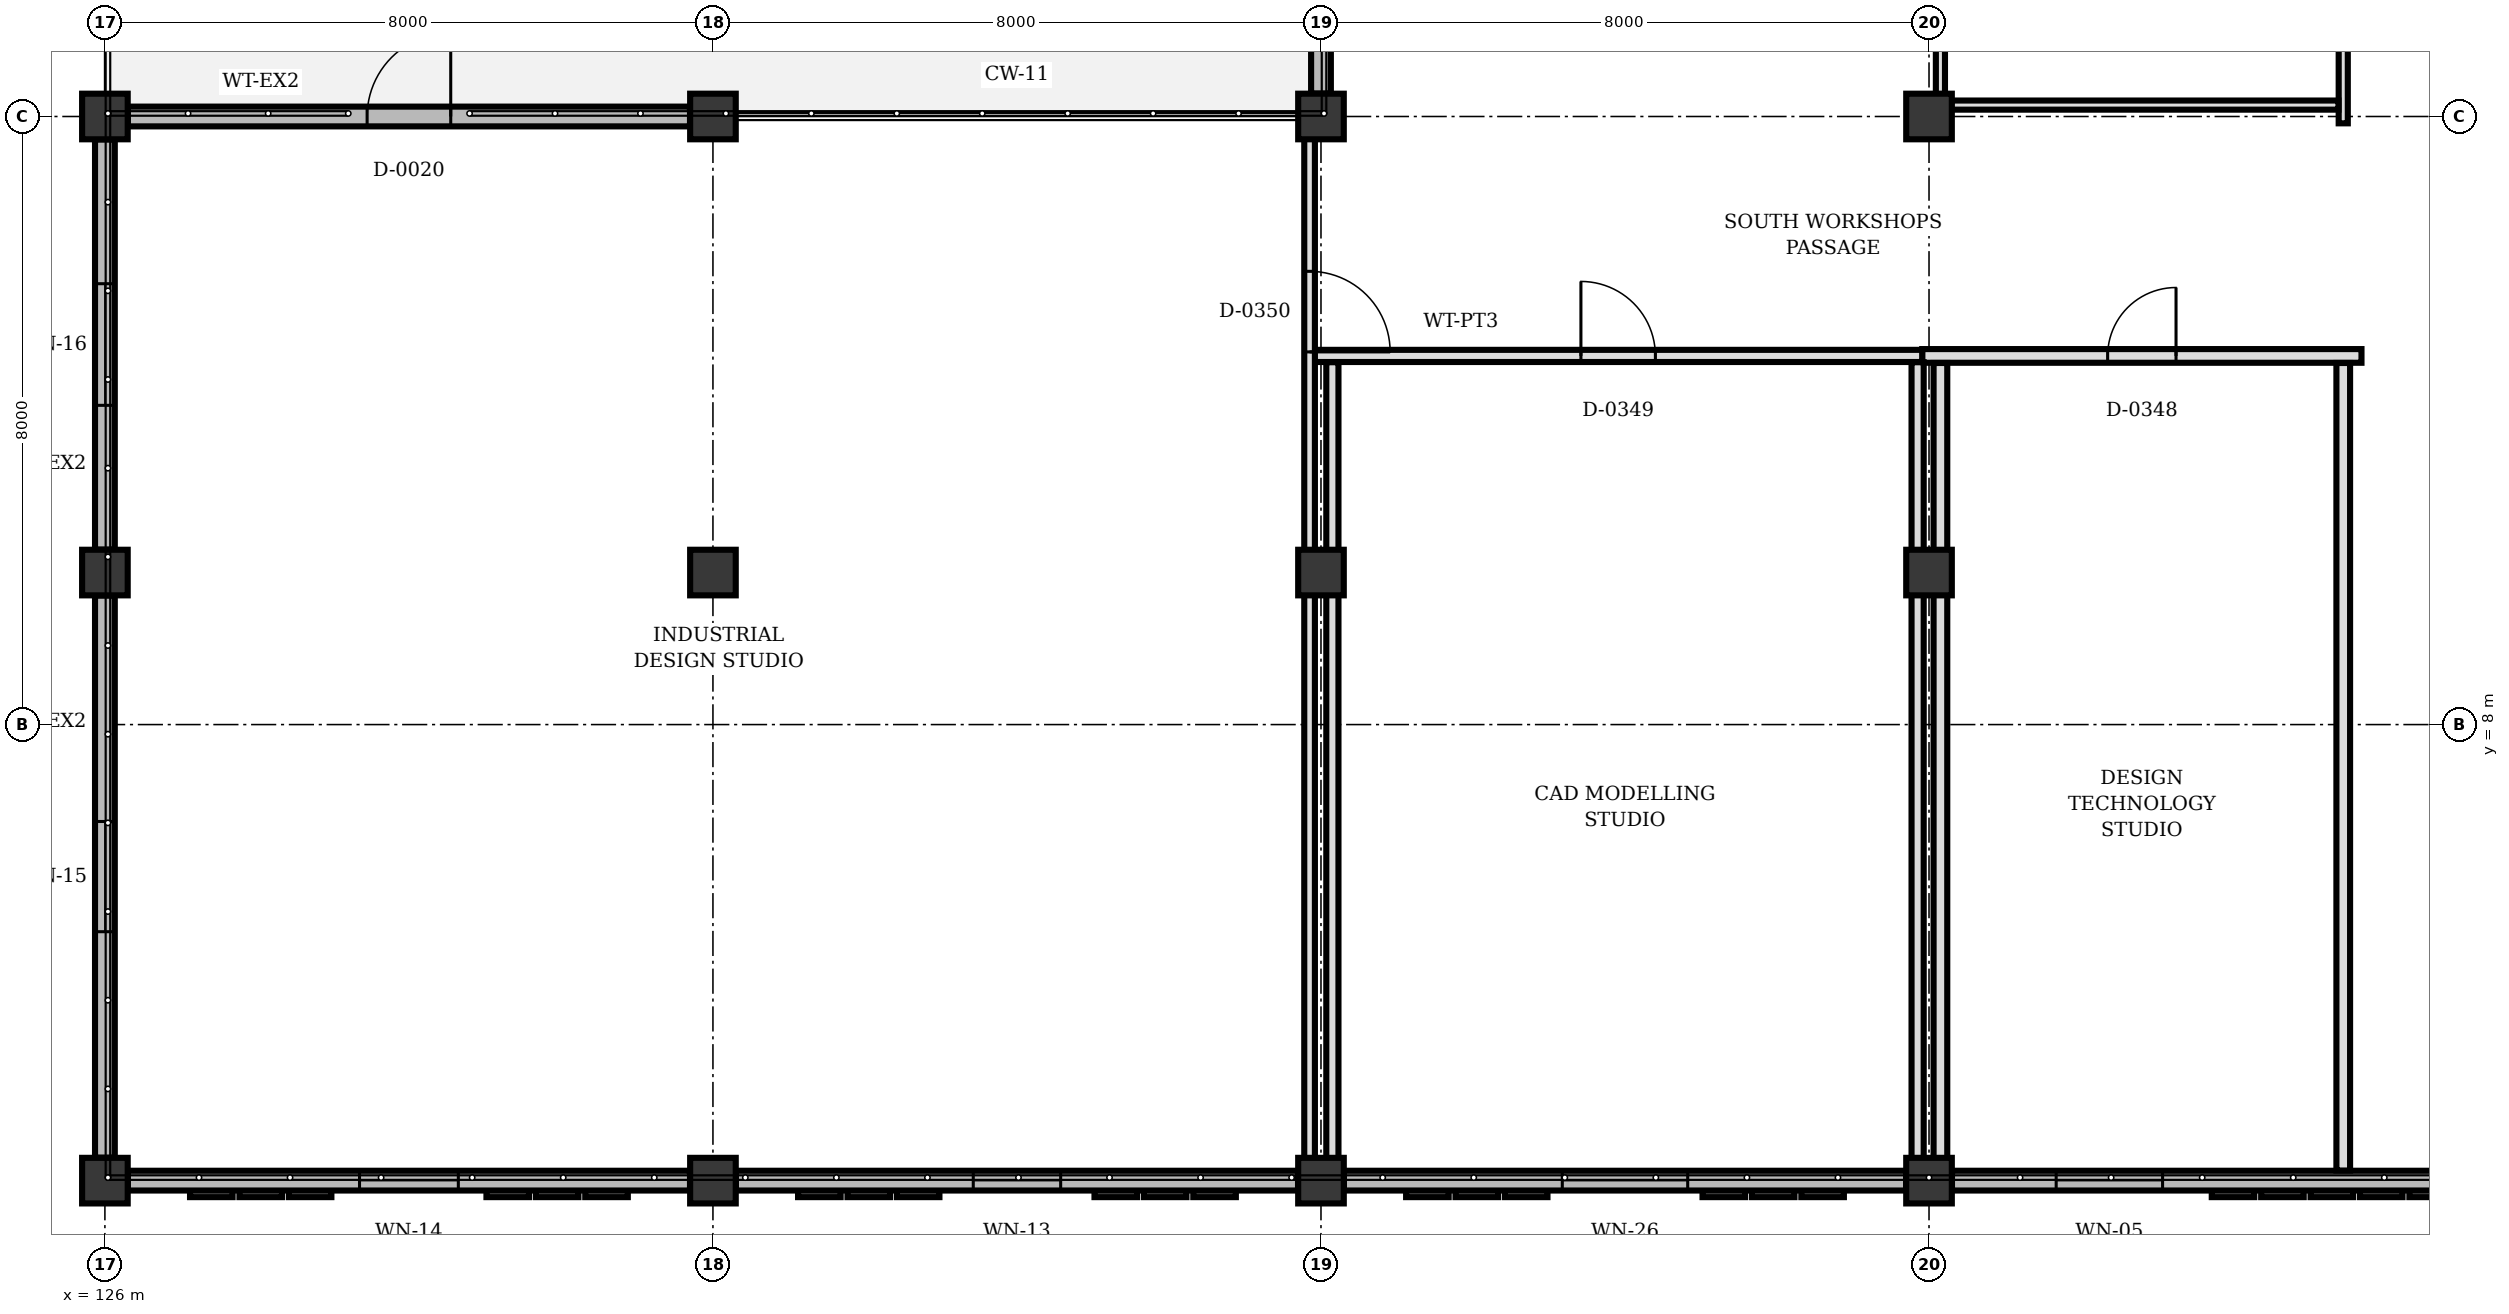
"""IFC4 building model, lengths in metres.
Left out: names, types, materials, properties, quantities, classifications, styles, units other than length and angle.
Written with IfcOpenShell. Run it as: python <this file> out.ifc"""

import sys

from ifc_helpers import new_model, si_unit, direction, frame, frame_2d, origin, origin_2d, place, context, subcontext, project, spatial, rectangle, extrude, element, fill, save


model = new_model("IFC4")
c1 = context("Model", 3, precision=1e-05, world=origin(), true_north=direction((0.0, 1.0)))
c2 = subcontext(c1, "Body", "Model", "MODEL_VIEW")
j1 = project(units=[si_unit("LENGTHUNIT", "METRE"), si_unit("PLANEANGLEUNIT", "RADIAN")], contexts=[c1])
p1 = place(None, origin())
s1 = spatial("IfcSite", under=j1, at=p1, CompositionType="ELEMENT")
p2 = place(p1, origin())
s2 = spatial("IfcBuilding", under=s1, at=p2, CompositionType="ELEMENT")
p3 = place(p2, frame((0.0, 0.0, 4.5)))
s3 = spatial("IfcBuildingStorey", under=s2, at=p3, CompositionType="ELEMENT", Elevation=4.5)
for number, where, z_axis, x_axis in (
    (1, (126.0, 10.0, 0.0), (0.0, 0.0, 1.0), (1.0, 0.0, 0.0)),
    (2, (126.0, 16.0, 0.0), (0.0, 0.0, 1.0), (1.0, 0.0, 0.0)),
    (3, (126.0, 2.0, 0.0), (0.0, 0.0, 1.0), (1.0, 0.0, 0.0)),
    (4, (134.0, 10.0, 0.0), (0.0, 0.0, 1.0), (1.0, 0.0, 0.0)),
    (5, (134.0, 16.0, 0.0), (0.0, 0.0, 1.0), (1.0, 0.0, 0.0)),
    (6, (134.0, 2.0, 0.0), (0.0, 0.0, 1.0), (1.0, 0.0, 0.0)),
    (7, (142.0, 10.0, 0.0), (0.0, 0.0, 1.0), (1.0, 0.0, 0.0)),
    (8, (142.0, 16.0, 0.0), (0.0, 0.0, 1.0), (1.0, 0.0, 0.0)),
    (9, (142.0, 2.0, 0.0), (0.0, 0.0, 1.0), (1.0, 0.0, 0.0)),
    (10, (150.0, 10.0, 0.0), (0.0, 0.0, 1.0), (1.0, 0.0, 0.0)),
    (11, (150.0, 16.0, 0.0), (0.0, 0.0, 1.0), (1.0, 0.0, 0.0)),
    (12, (150.0, 2.0, 0.0), (0.0, 0.0, 1.0), (1.0, 0.0, 0.0)),
):
    element("IfcColumn", number, at=place(p3, frame(where, z_axis=z_axis, x_axis=x_axis)), inside=s3, PredefinedType="COLUMN", context=c2, shape_type="SweptSolid", body=[
        extrude(rectangle(XDim=0.6, YDim=0.6, at=origin_2d()), origin(), (0.0, 0.0, 1.0), 4.0),
    ])
p4 = place(p3, frame((126.0, 2.302, 0.0), z_axis=(0.0, 0.0, 1.0), x_axis=(0.0, 1.0, 0.0)))
e13 = element("IfcWall", 13, at=p4, inside=s3, PredefinedType="SOLIDWALL", context=c2, shape_type="SweptSolid", body=[
    extrude(rectangle(XDim=7.396, YDim=0.26, at=frame_2d((3.698, 0.0))), origin(), (0.0, 0.0, 1.0), 3.152),
])
p5 = place(p4, frame((2.973, 0.0, 0.9)))
e14 = element("IfcOpeningElement", 14, at=p5, cuts=e13, PredefinedType="OPENING", context=c2, shape_type="SweptSolid", body=[
    extrude(rectangle(XDim=1.45, YDim=1.25, at=frame_2d((0.725, 0.625))), frame((0.0, 0.14, 0.0), z_axis=(0.0, -1.0, 0.0), x_axis=(1.0, 0.0, 0.0)), (0.0, 0.0, 1.0), 0.28),
])
p6 = place(p3, frame((126.0, 10.302, 0.0), z_axis=(0.0, 0.0, 1.0), x_axis=(0.0, 1.0, 0.0)))
e15 = element("IfcWall", 15, at=p6, inside=s3, PredefinedType="SOLIDWALL", context=c2, shape_type="SweptSolid", body=[
    extrude(rectangle(XDim=5.396, YDim=0.26, at=frame_2d((2.698, 0.0))), origin(), (0.0, 0.0, 1.0), 3.152),
])
p7 = place(p6, frame((1.898, 0.0, 0.9)))
e16 = element("IfcOpeningElement", 16, at=p7, cuts=e15, PredefinedType="OPENING", context=c2, shape_type="SweptSolid", body=[
    extrude(rectangle(XDim=1.6, YDim=1.25, at=frame_2d((0.8, 0.625))), frame((0.0, 0.14, 0.0), z_axis=(0.0, -1.0, 0.0), x_axis=(1.0, 0.0, 0.0)), (0.0, 0.0, 1.0), 0.28),
])
p8 = place(p3, frame((126.302, 16.0, 0.0), z_axis=(0.0, 0.0, 1.0), x_axis=(1.0, 0.0, 0.0)))
e17 = element("IfcWall", 17, at=p8, inside=s3, PredefinedType="SOLIDWALL", context=c2, shape_type="SweptSolid", body=[
    extrude(rectangle(XDim=7.396, YDim=0.26, at=frame_2d((3.698, 0.0))), origin(), (0.0, 0.0, 1.0), 3.052),
])
p9 = place(p8, frame((3.148, 0.0, 0.0)))
e18 = element("IfcOpeningElement", 18, at=p9, cuts=e17, PredefinedType="OPENING", context=c2, shape_type="SweptSolid", body=[
    extrude(rectangle(XDim=1.1, YDim=2.25, at=frame_2d((0.55, 1.125))), frame((0.0, 0.14, 0.0), z_axis=(0.0, -1.0, 0.0), x_axis=(1.0, 0.0, 0.0)), (0.0, 0.0, 1.0), 0.28),
])
p10 = place(p3, frame((142.0, 16.302, 0.0), z_axis=(0.0, 0.0, 1.0), x_axis=(0.0, 1.0, 0.0)))
e19 = element("IfcWall", 19, at=p10, inside=s3, PredefinedType="SOLIDWALL", context=c2, shape_type="SweptSolid", body=[
    extrude(rectangle(XDim=7.396, YDim=0.26, at=frame_2d((3.698, 0.0))), origin(), (0.0, 0.0, 1.0), 3.152),
])
p11 = place(p10, frame((3.098, 0.0, 0.0)))
e20 = element("IfcOpeningElement", 20, at=p11, cuts=e19, PredefinedType="OPENING", context=c2, shape_type="SweptSolid", body=[
    extrude(rectangle(XDim=1.2, YDim=2.25, at=frame_2d((0.6, 1.125))), frame((0.0, 0.14, 0.0), z_axis=(0.0, -1.0, 0.0), x_axis=(1.0, 0.0, 0.0)), (0.0, 0.0, 1.0), 0.28),
])
p12 = place(p3, frame((157.698, 2.0, 0.0), z_axis=(0.0, 0.0, 1.0), x_axis=(-1.0, 0.0, 0.0)))
e21 = element("IfcWall", 21, at=p12, inside=s3, PredefinedType="SOLIDWALL", context=c2, shape_type="SweptSolid", body=[
    extrude(rectangle(XDim=7.396, YDim=0.26, at=frame_2d((3.698, 0.0))), origin(), (0.0, 0.0, 1.0), 3.052),
])
p13 = place(p12, frame((4.625, 0.0, 0.9)))
e22 = element("IfcOpeningElement", 22, at=p13, cuts=e21, PredefinedType="OPENING", context=c2, shape_type="SweptSolid", body=[
    extrude(rectangle(XDim=1.4, YDim=1.1, at=frame_2d((0.7, 0.55))), frame((0.0, 0.14, 0.0), z_axis=(0.0, -1.0, 0.0), x_axis=(1.0, 0.0, 0.0)), (0.0, 0.0, 1.0), 0.28),
])
p14 = place(p3, frame((149.698, 2.0, 0.0), z_axis=(0.0, 0.0, 1.0), x_axis=(-1.0, 0.0, 0.0)))
e23 = element("IfcWall", 23, at=p14, inside=s3, PredefinedType="SOLIDWALL", context=c2, shape_type="SweptSolid", body=[
    extrude(rectangle(XDim=7.396, YDim=0.26, at=frame_2d((3.698, 0.0))), origin(), (0.0, 0.0, 1.0), 3.052),
])
p15 = place(p14, frame((2.873, 0.0, 0.9)))
e24 = element("IfcOpeningElement", 24, at=p15, cuts=e23, PredefinedType="OPENING", context=c2, shape_type="SweptSolid", body=[
    extrude(rectangle(XDim=1.65, YDim=1.4, at=frame_2d((0.825, 0.7))), frame((0.0, 0.14, 0.0), z_axis=(0.0, -1.0, 0.0), x_axis=(1.0, 0.0, 0.0)), (0.0, 0.0, 1.0), 0.28),
])
p16 = place(p3, frame((141.698, 2.0, 0.0), z_axis=(0.0, 0.0, 1.0), x_axis=(-1.0, 0.0, 0.0)))
e25 = element("IfcWall", 25, at=p16, inside=s3, PredefinedType="SOLIDWALL", context=c2, shape_type="SweptSolid", body=[
    extrude(rectangle(XDim=7.396, YDim=0.26, at=frame_2d((3.698, 0.0))), origin(), (0.0, 0.0, 1.0), 3.052),
])
p17 = place(p16, frame((3.123, 0.0, 0.9)))
e26 = element("IfcOpeningElement", 26, at=p17, cuts=e25, PredefinedType="OPENING", context=c2, shape_type="SweptSolid", body=[
    extrude(rectangle(XDim=1.15, YDim=1.25, at=frame_2d((0.575, 0.625))), frame((0.0, 0.14, 0.0), z_axis=(0.0, -1.0, 0.0), x_axis=(1.0, 0.0, 0.0)), (0.0, 0.0, 1.0), 0.28),
])
p18 = place(p3, frame((133.698, 2.0, 0.0), z_axis=(0.0, 0.0, 1.0), x_axis=(-1.0, 0.0, 0.0)))
e27 = element("IfcWall", 27, at=p18, inside=s3, PredefinedType="SOLIDWALL", context=c2, shape_type="SweptSolid", body=[
    extrude(rectangle(XDim=7.396, YDim=0.26, at=frame_2d((3.698, 0.0))), origin(), (0.0, 0.0, 1.0), 3.052),
])
p19 = place(p18, frame((3.048, 0.0, 0.9)))
e28 = element("IfcOpeningElement", 28, at=p19, cuts=e27, PredefinedType="OPENING", context=c2, shape_type="SweptSolid", body=[
    extrude(rectangle(XDim=1.3, YDim=1.25, at=frame_2d((0.65, 0.625))), frame((0.0, 0.14, 0.0), z_axis=(0.0, -1.0, 0.0), x_axis=(1.0, 0.0, 0.0)), (0.0, 0.0, 1.0), 0.28),
])
p20 = place(p3, frame((149.91, 12.85, 0.0), z_axis=(0.0, 0.0, 1.0), x_axis=(1.0, 0.0, 0.0)))
e29 = element("IfcWall", 29, at=p20, inside=s3, PredefinedType="PARTITIONING", context=c2, shape_type="SweptSolid", body=[
    extrude(rectangle(XDim=5.78, YDim=0.18, at=frame_2d((2.89, 0.0))), origin(), (0.0, 0.0, 1.0), 3.152),
])
p21 = place(p20, frame((2.44, 0.0, 0.0)))
e30 = element("IfcOpeningElement", 30, at=p21, cuts=e29, PredefinedType="OPENING", context=c2, shape_type="SweptSolid", body=[
    extrude(rectangle(XDim=0.9, YDim=2.2, at=frame_2d((0.45, 1.1))), frame((0.0, 0.1, 0.0), z_axis=(0.0, -1.0, 0.0), x_axis=(1.0, 0.0, 0.0)), (0.0, 0.0, 1.0), 0.2),
])
p22 = place(p3, frame((155.45, 12.757, 0.0), z_axis=(0.0, 0.0, 1.0), x_axis=(0.0, -1.0, 0.0)))
e31 = element("IfcWall", 31, at=p22, inside=s3, PredefinedType="PARTITIONING", context=c2, shape_type="SweptSolid", body=[
    extrude(rectangle(XDim=10.624, YDim=0.18, at=frame_2d((5.312, 0.0))), origin(), (0.0, 0.0, 1.0), 3.052),
])
p23 = place(p3, frame((150.15, 2.292, 0.0), z_axis=(0.0, 0.0, 1.0), x_axis=(0.0, 1.0, 0.0)))
e32 = element("IfcWall", 32, at=p23, inside=s3, PredefinedType="PARTITIONING", context=c2, shape_type="SweptSolid", body=[
    extrude(rectangle(XDim=7.416, YDim=0.18, at=frame_2d((3.708, 0.0))), origin(), (0.0, 0.0, 1.0), 3.052),
])
p24 = place(p3, frame((150.15, 10.292, 0.0), z_axis=(0.0, 0.0, 1.0), x_axis=(0.0, 1.0, 0.0)))
e33 = element("IfcWall", 33, at=p24, inside=s3, PredefinedType="PARTITIONING", context=c2, shape_type="SweptSolid", body=[
    extrude(rectangle(XDim=2.465, YDim=0.18, at=frame_2d((1.232, 0.0))), origin(), (0.0, 0.0, 1.0), 3.052),
])
p25 = place(p3, frame((141.91, 12.85, 0.0), z_axis=(0.0, 0.0, 1.0), x_axis=(1.0, 0.0, 0.0)))
e34 = element("IfcWall", 34, at=p25, inside=s3, PredefinedType="PARTITIONING", context=c2, shape_type="SweptSolid", body=[
    extrude(rectangle(XDim=8.0, YDim=0.16, at=frame_2d((4.0, 0.0))), origin(), (0.0, 0.0, 1.0), 3.152),
])
p26 = place(p25, frame((3.51, 0.0, 0.0)))
e35 = element("IfcOpeningElement", 35, at=p26, cuts=e34, PredefinedType="OPENING", context=c2, shape_type="SweptSolid", body=[
    extrude(rectangle(XDim=0.98, YDim=2.2, at=frame_2d((0.49, 1.1))), frame((0.0, 0.09, 0.0), z_axis=(0.0, -1.0, 0.0), x_axis=(1.0, 0.0, 0.0)), (0.0, 0.0, 1.0), 0.18),
])
p27 = place(p3, frame((149.85, 12.767, 0.0), z_axis=(0.0, 0.0, 1.0), x_axis=(0.0, -1.0, 0.0)))
e36 = element("IfcWall", 36, at=p27, inside=s3, PredefinedType="PARTITIONING", context=c2, shape_type="SweptSolid", body=[
    extrude(rectangle(XDim=2.475, YDim=0.16, at=frame_2d((1.238, 0.0))), origin(), (0.0, 0.0, 1.0), 3.052),
])
for number, where, z_axis, x_axis in (
    (37, (149.85, 9.708, 0.0), (0.0, 0.0, 1.0), (0.0, -1.0, 0.0)),
    (38, (142.15, 2.292, 0.0), (0.0, 0.0, 1.0), (0.0, 1.0, 0.0)),
):
    element("IfcWall", number, at=place(p3, frame(where, z_axis=z_axis, x_axis=x_axis)), inside=s3, PredefinedType="PARTITIONING", context=c2, shape_type="SweptSolid", body=[
        extrude(rectangle(XDim=7.416, YDim=0.16, at=frame_2d((3.708, 0.0))), origin(), (0.0, 0.0, 1.0), 3.052),
    ])
p28 = place(p3, frame((142.15, 10.292, 0.0), z_axis=(0.0, 0.0, 1.0), x_axis=(0.0, 1.0, 0.0)))
e39 = element("IfcWall", 39, at=p28, inside=s3, PredefinedType="PARTITIONING", context=c2, shape_type="SweptSolid", body=[
    extrude(rectangle(XDim=2.475, YDim=0.16, at=frame_2d((1.238, 0.0))), origin(), (0.0, 0.0, 1.0), 3.052),
])
p29 = place(p3, frame((141.85, 15.708, 0.0), z_axis=(0.0, 0.0, 1.0), x_axis=(0.0, -1.0, 0.0)))
e40 = element("IfcWall", 40, at=p29, inside=s3, PredefinedType="PARTITIONING", context=c2, shape_type="SweptSolid", body=[
    extrude(rectangle(XDim=5.416, YDim=0.14, at=frame_2d((2.708, 0.0))), origin(), (0.0, 0.0, 1.0), 3.052),
])
p30 = place(p29, frame((1.745, 0.0, 0.0)))
e41 = element("IfcOpeningElement", 41, at=p30, cuts=e40, PredefinedType="OPENING", context=c2, shape_type="SweptSolid", body=[
    extrude(rectangle(XDim=1.06, YDim=2.2, at=frame_2d((0.53, 1.1))), frame((0.0, 0.08, 0.0), z_axis=(0.0, -1.0, 0.0), x_axis=(1.0, 0.0, 0.0)), (0.0, 0.0, 1.0), 0.16),
])
p31 = place(p3, frame((141.85, 9.708, 0.0), z_axis=(0.0, 0.0, 1.0), x_axis=(0.0, -1.0, 0.0)))
e42 = element("IfcWall", 42, at=p31, inside=s3, PredefinedType="PARTITIONING", context=c2, shape_type="SweptSolid", body=[
    extrude(rectangle(XDim=7.416, YDim=0.14, at=frame_2d((3.708, 0.0))), origin(), (0.0, 0.0, 1.0), 3.052),
])
p32 = place(p3, frame((155.45, 32.008, 0.0), z_axis=(0.0, 0.0, 1.0), x_axis=(0.0, -1.0, 0.0)))
e43 = element("IfcWall", 43, at=p32, inside=s3, PredefinedType="PARTITIONING", context=c2, shape_type="SweptSolid", body=[
    extrude(rectangle(XDim=16.098, YDim=0.12, at=frame_2d((8.049, 0.0))), origin(), (0.0, 0.0, 1.0), 3.052),
])
p33 = place(p32, frame((7.474, 0.0, 0.0)))
e44 = element("IfcOpeningElement", 44, at=p33, cuts=e43, PredefinedType="OPENING", context=c2, shape_type="SweptSolid", body=[
    extrude(rectangle(XDim=1.15, YDim=2.2, at=frame_2d((0.575, 1.1))), frame((0.0, 0.07, 0.0), z_axis=(0.0, -1.0, 0.0), x_axis=(1.0, 0.0, 0.0)), (0.0, 0.0, 1.0), 0.14),
])
p34 = place(p3, frame((155.387, 16.15, 0.0), z_axis=(0.0, 0.0, 1.0), x_axis=(-1.0, 0.0, 0.0)))
e45 = element("IfcWall", 45, at=p34, inside=s3, PredefinedType="PARTITIONING", context=c2, shape_type="SweptSolid", body=[
    extrude(rectangle(XDim=5.095, YDim=0.12, at=frame_2d((2.547, 0.0))), origin(), (0.0, 0.0, 1.0), 3.052),
])
p35 = place(p3, frame((150.15, 16.292, 0.0), z_axis=(0.0, 0.0, 1.0), x_axis=(0.0, 1.0, 0.0)))
e46 = element("IfcWall", 46, at=p35, inside=s3, PredefinedType="PARTITIONING", context=c2, shape_type="SweptSolid", body=[
    extrude(rectangle(XDim=7.416, YDim=0.12, at=frame_2d((3.708, 0.0))), origin(), (0.0, 0.0, 1.0), 3.052),
])
p36 = place(p5, origin())
e47 = element("IfcWindow", 47, at=p36, inside=s3, PartitioningType="SINGLE_PANEL", PredefinedType="WINDOW", context=c2, shape_type="SweptSolid", body=[
    extrude(rectangle(XDim=1.45, YDim=1.25, at=frame_2d((0.725, 0.625))), frame((0.0, 0.03, 0.0), z_axis=(0.0, -1.0, 0.0), x_axis=(1.0, 0.0, 0.0)), (0.0, 0.0, 1.0), 0.06),
])
fill(e14, e47)
p37 = place(p7, origin())
e48 = element("IfcWindow", 48, at=p37, inside=s3, PartitioningType="SINGLE_PANEL", PredefinedType="WINDOW", context=c2, shape_type="SweptSolid", body=[
    extrude(rectangle(XDim=1.6, YDim=1.25, at=frame_2d((0.8, 0.625))), frame((0.0, 0.03, 0.0), z_axis=(0.0, -1.0, 0.0), x_axis=(1.0, 0.0, 0.0)), (0.0, 0.0, 1.0), 0.06),
])
fill(e16, e48)
p38 = place(p9, origin())
e49 = element("IfcDoor", 49, at=p38, inside=s3, OperationType="SINGLE_SWING_RIGHT", PredefinedType="DOOR", context=c2, shape_type="SweptSolid", body=[
    extrude(rectangle(XDim=1.1, YDim=2.25, at=frame_2d((0.55, 1.125))), frame((0.0, 0.025, 0.0), z_axis=(0.0, -1.0, 0.0), x_axis=(1.0, 0.0, 0.0)), (0.0, 0.0, 1.0), 0.05),
])
fill(e18, e49)
p39 = place(p13, origin())
e50 = element("IfcWindow", 50, at=p39, inside=s3, PartitioningType="SINGLE_PANEL", PredefinedType="WINDOW", context=c2, shape_type="SweptSolid", body=[
    extrude(rectangle(XDim=1.4, YDim=1.1, at=frame_2d((0.7, 0.55))), frame((0.0, 0.03, 0.0), z_axis=(0.0, -1.0, 0.0), x_axis=(1.0, 0.0, 0.0)), (0.0, 0.0, 1.0), 0.06),
])
fill(e22, e50)
p40 = place(p15, origin())
e51 = element("IfcWindow", 51, at=p40, inside=s3, PartitioningType="SINGLE_PANEL", PredefinedType="WINDOW", context=c2, shape_type="SweptSolid", body=[
    extrude(rectangle(XDim=1.65, YDim=1.4, at=frame_2d((0.825, 0.7))), frame((0.0, 0.03, 0.0), z_axis=(0.0, -1.0, 0.0), x_axis=(1.0, 0.0, 0.0)), (0.0, 0.0, 1.0), 0.06),
])
fill(e24, e51)
p41 = place(p17, origin())
e52 = element("IfcWindow", 52, at=p41, inside=s3, PartitioningType="SINGLE_PANEL", PredefinedType="WINDOW", context=c2, shape_type="SweptSolid", body=[
    extrude(rectangle(XDim=1.15, YDim=1.25, at=frame_2d((0.575, 0.625))), frame((0.0, 0.03, 0.0), z_axis=(0.0, -1.0, 0.0), x_axis=(1.0, 0.0, 0.0)), (0.0, 0.0, 1.0), 0.06),
])
fill(e26, e52)
p42 = place(p19, origin())
e53 = element("IfcWindow", 53, at=p42, inside=s3, PartitioningType="SINGLE_PANEL", PredefinedType="WINDOW", context=c2, shape_type="SweptSolid", body=[
    extrude(rectangle(XDim=1.3, YDim=1.25, at=frame_2d((0.65, 0.625))), frame((0.0, 0.03, 0.0), z_axis=(0.0, -1.0, 0.0), x_axis=(1.0, 0.0, 0.0)), (0.0, 0.0, 1.0), 0.06),
])
fill(e28, e53)
p43 = place(p21, origin())
e54 = element("IfcDoor", 54, at=p43, inside=s3, OperationType="SINGLE_SWING_RIGHT", PredefinedType="DOOR", context=c2, shape_type="SweptSolid", body=[
    extrude(rectangle(XDim=0.9, YDim=2.2, at=frame_2d((0.45, 1.1))), frame((0.0, 0.025, 0.0), z_axis=(0.0, -1.0, 0.0), x_axis=(1.0, 0.0, 0.0)), (0.0, 0.0, 1.0), 0.05),
])
fill(e30, e54)
p44 = place(p26, origin())
e55 = element("IfcDoor", 55, at=p44, inside=s3, OperationType="SINGLE_SWING_LEFT", PredefinedType="DOOR", context=c2, shape_type="SweptSolid", body=[
    extrude(rectangle(XDim=0.98, YDim=2.2, at=frame_2d((0.49, 1.1))), frame((0.0, 0.025, 0.0), z_axis=(0.0, -1.0, 0.0), x_axis=(1.0, 0.0, 0.0)), (0.0, 0.0, 1.0), 0.05),
])
fill(e35, e55)
p45 = place(p30, origin())
e56 = element("IfcDoor", 56, at=p45, inside=s3, OperationType="SINGLE_SWING_RIGHT", PredefinedType="DOOR", context=c2, shape_type="SweptSolid", body=[
    extrude(rectangle(XDim=1.06, YDim=2.2, at=frame_2d((0.53, 1.1))), frame((0.0, 0.025, 0.0), z_axis=(0.0, -1.0, 0.0), x_axis=(1.0, 0.0, 0.0)), (0.0, 0.0, 1.0), 0.05),
])
fill(e41, e56)
save(model, sys.argv[1])
